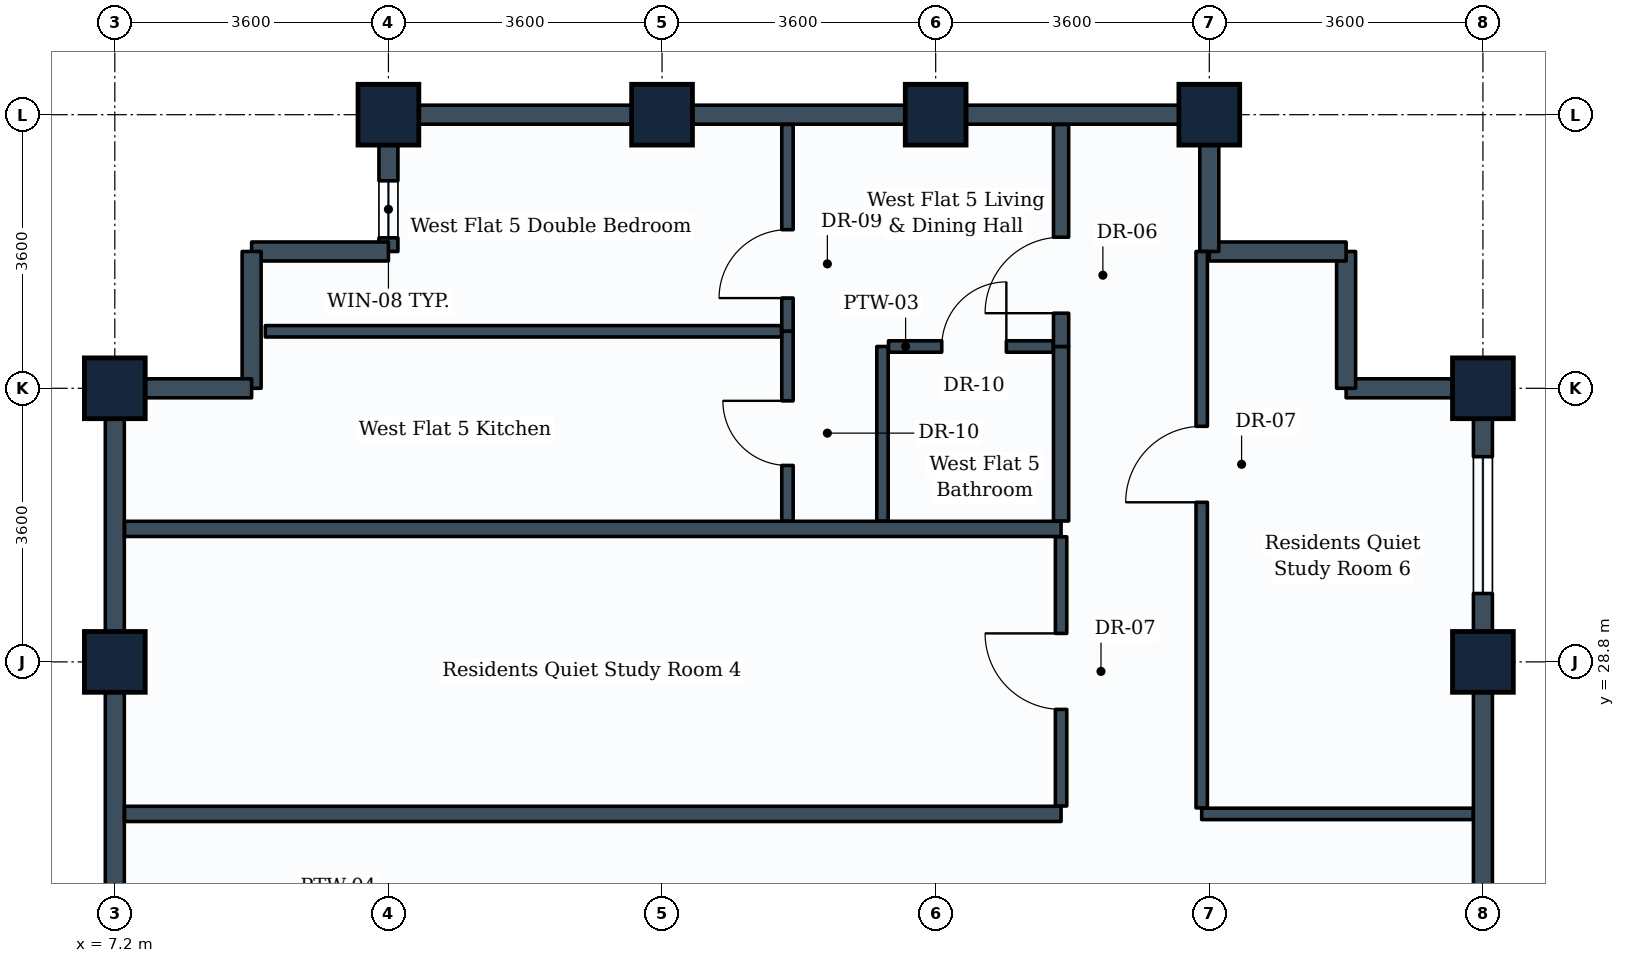
"""IFC4 building model, lengths in metres.
Left out: names, types, materials, properties, quantities, classifications, styles, units other than length and angle.
Written with IfcOpenShell. Run it as: python <this file> out.ifc"""

import sys

from ifc_helpers import new_model, si_unit, direction, frame, frame_2d, origin, origin_2d, place, context, subcontext, project, spatial, rectangle, extrude, element, fill, save


model = new_model("IFC4")
c1 = context("Model", 3, precision=1e-05, world=origin(), true_north=direction((0.0, 1.0)))
c2 = subcontext(c1, "Body", "Model", "MODEL_VIEW")
j1 = project(units=[si_unit("LENGTHUNIT", "METRE"), si_unit("PLANEANGLEUNIT", "RADIAN")], contexts=[c1])
p1 = place(None, origin())
s1 = spatial("IfcSite", under=j1, at=p1, CompositionType="ELEMENT")
p2 = place(p1, origin())
s2 = spatial("IfcBuilding", under=s1, at=p2, CompositionType="ELEMENT")
p3 = place(p2, frame((0.0, 0.0, 273.8)))
s3 = spatial("IfcBuildingStorey", under=s2, at=p3, CompositionType="ELEMENT", Elevation=273.8)
for number, where, z_axis, x_axis in (
    (1, (7.2, 28.8, 0.0), (0.0, 0.0, 1.0), (0.0, 1.0, 0.0)),
    (2, (7.2, 32.4, 0.0), (0.0, 0.0, 1.0), (0.0, 1.0, 0.0)),
    (3, (10.8, 36.0, 0.0), (0.0, 0.0, 1.0), (1.0, 0.0, 0.0)),
    (4, (14.4, 36.0, 0.0), (0.0, 0.0, 1.0), (1.0, 0.0, 0.0)),
    (5, (18.0, 36.0, 0.0), (0.0, 0.0, 1.0), (1.0, 0.0, 0.0)),
    (6, (21.6, 36.0, 0.0), (0.0, 0.0, 1.0), (1.0, 0.0, 0.0)),
    (7, (25.2, 28.8, 0.0), (0.0, 0.0, 1.0), (0.0, 1.0, 0.0)),
    (8, (25.2, 32.4, 0.0), (0.0, 0.0, 1.0), (0.0, 1.0, 0.0)),
):
    element("IfcColumn", number, at=place(p3, frame(where, z_axis=z_axis, x_axis=x_axis)), inside=s3, PredefinedType="COLUMN", context=c2, shape_type="SweptSolid", body=[
        extrude(rectangle(XDim=0.8, YDim=0.8, at=origin_2d()), origin(), (0.0, 0.0, 1.0), 3.6),
    ])
p4 = place(p3, frame((25.2, 28.8, 0.0), z_axis=(0.0, 0.0, 1.0), x_axis=(0.0, -1.0, 0.0)))
e9 = element("IfcWall", 9, at=p4, inside=s3, PredefinedType="STANDARD", context=c2, shape_type="SweptSolid", body=[
    extrude(rectangle(XDim=3.6, YDim=0.25, at=frame_2d((1.8, 0.0))), origin(), (0.0, 0.0, 1.0), 2.83),
])
p5 = place(p3, frame((25.2, 32.4, 0.0), z_axis=(0.0, 0.0, 1.0), x_axis=(0.0, -1.0, 0.0)))
e10 = element("IfcWall", 10, at=p5, inside=s3, PredefinedType="STANDARD", context=c2, shape_type="SweptSolid", body=[
    extrude(rectangle(XDim=3.6, YDim=0.25, at=frame_2d((1.8, 0.0))), origin(), (0.0, 0.0, 1.0), 2.83),
])
p6 = place(p5, frame((0.9, 0.0, 0.85)))
e11 = element("IfcOpeningElement", 11, at=p6, cuts=e10, PredefinedType="OPENING", context=c2, shape_type="SweptSolid", body=[
    extrude(rectangle(XDim=1.8, YDim=1.35, at=frame_2d((0.9, 0.675))), frame((0.0, 0.135, 0.0), z_axis=(0.0, -1.0, 0.0), x_axis=(1.0, 0.0, 0.0)), (0.0, 0.0, 1.0), 0.27),
])
p7 = place(p3, frame((23.4, 32.4, 0.0), z_axis=(0.0, 0.0, 1.0), x_axis=(1.0, 0.0, 0.0)))
e12 = element("IfcWall", 12, at=p7, inside=s3, PredefinedType="STANDARD", context=c2, shape_type="SweptSolid", body=[
    extrude(rectangle(XDim=1.8, YDim=0.25, at=frame_2d((0.9, 0.0))), origin(), (0.0, 0.0, 1.0), 2.83),
])
p8 = place(p3, frame((23.4, 32.4, 0.0), z_axis=(0.0, 0.0, 1.0), x_axis=(0.0, 1.0, 0.0)))
e13 = element("IfcWall", 13, at=p8, inside=s3, PredefinedType="STANDARD", context=c2, shape_type="SweptSolid", body=[
    extrude(rectangle(XDim=1.8, YDim=0.25, at=frame_2d((0.9, 0.0))), origin(), (0.0, 0.0, 1.0), 3.335),
])
p9 = place(p3, frame((21.6, 34.2, 0.0), z_axis=(0.0, 0.0, 1.0), x_axis=(1.0, 0.0, 0.0)))
e14 = element("IfcWall", 14, at=p9, inside=s3, PredefinedType="STANDARD", context=c2, shape_type="SweptSolid", body=[
    extrude(rectangle(XDim=1.8, YDim=0.25, at=frame_2d((0.9, 0.0))), origin(), (0.0, 0.0, 1.0), 3.335),
])
p10 = place(p3, frame((21.6, 34.2, 0.0), z_axis=(0.0, 0.0, 1.0), x_axis=(0.0, 1.0, 0.0)))
e15 = element("IfcWall", 15, at=p10, inside=s3, PredefinedType="STANDARD", context=c2, shape_type="SweptSolid", body=[
    extrude(rectangle(XDim=1.8, YDim=0.25, at=frame_2d((0.9, 0.0))), origin(), (0.0, 0.0, 1.0), 2.83),
])
for number, where, z_axis, x_axis in (
    (16, (18.0, 36.0, 0.0), (0.0, 0.0, 1.0), (1.0, 0.0, 0.0)),
    (17, (14.4, 36.0, 0.0), (0.0, 0.0, 1.0), (1.0, 0.0, 0.0)),
):
    element("IfcWall", number, at=place(p3, frame(where, z_axis=z_axis, x_axis=x_axis)), inside=s3, PredefinedType="STANDARD", context=c2, shape_type="SweptSolid", body=[
        extrude(rectangle(XDim=3.6, YDim=0.25, at=frame_2d((1.8, 0.0))), origin(), (0.0, 0.0, 1.0), 2.83),
    ])
p11 = place(p3, frame((10.8, 36.0, 0.0), z_axis=(0.0, 0.0, 1.0), x_axis=(1.0, 0.0, 0.0)))
e18 = element("IfcWall", 18, at=p11, inside=s3, PredefinedType="STANDARD", context=c2, shape_type="SweptSolid", body=[
    extrude(rectangle(XDim=3.6, YDim=0.25, at=frame_2d((1.8, 0.0))), origin(), (0.0, 0.0, 1.0), 2.83),
])
p12 = place(p3, frame((10.8, 34.2, 0.0), z_axis=(0.0, 0.0, 1.0), x_axis=(0.0, 1.0, 0.0)))
e19 = element("IfcWall", 19, at=p12, inside=s3, PredefinedType="STANDARD", context=c2, shape_type="SweptSolid", body=[
    extrude(rectangle(XDim=1.8, YDim=0.25, at=frame_2d((0.9, 0.0))), origin(), (0.0, 0.0, 1.0), 2.83),
])
p13 = place(p12, frame((0.18, 0.0, 0.85)))
e20 = element("IfcOpeningElement", 20, at=p13, cuts=e19, PredefinedType="OPENING", context=c2, shape_type="SweptSolid", body=[
    extrude(rectangle(XDim=0.75, YDim=1.05, at=frame_2d((0.375, 0.525))), frame((0.0, 0.135, 0.0), z_axis=(0.0, -1.0, 0.0), x_axis=(1.0, 0.0, 0.0)), (0.0, 0.0, 1.0), 0.27),
])
for number, where, z_axis, x_axis in (
    (21, (9.0, 34.2, 0.0), (0.0, 0.0, 1.0), (1.0, 0.0, 0.0)),
    (22, (9.0, 32.4, 0.0), (0.0, 0.0, 1.0), (0.0, 1.0, 0.0)),
):
    element("IfcWall", number, at=place(p3, frame(where, z_axis=z_axis, x_axis=x_axis)), inside=s3, PredefinedType="STANDARD", context=c2, shape_type="SweptSolid", body=[
        extrude(rectangle(XDim=1.8, YDim=0.25, at=frame_2d((0.9, 0.0))), origin(), (0.0, 0.0, 1.0), 3.335),
    ])
p14 = place(p3, frame((7.2, 32.4, 0.0), z_axis=(0.0, 0.0, 1.0), x_axis=(1.0, 0.0, 0.0)))
e23 = element("IfcWall", 23, at=p14, inside=s3, PredefinedType="STANDARD", context=c2, shape_type="SweptSolid", body=[
    extrude(rectangle(XDim=1.8, YDim=0.25, at=frame_2d((0.9, 0.0))), origin(), (0.0, 0.0, 1.0), 2.83),
])
p15 = place(p3, frame((7.2, 28.8, 0.0), z_axis=(0.0, 0.0, 1.0), x_axis=(0.0, 1.0, 0.0)))
e24 = element("IfcWall", 24, at=p15, inside=s3, PredefinedType="STANDARD", context=c2, shape_type="SweptSolid", body=[
    extrude(rectangle(XDim=3.6, YDim=0.25, at=frame_2d((1.8, 0.0))), origin(), (0.0, 0.0, 1.0), 2.83),
])
p16 = place(p3, frame((7.2, 25.2, 0.0), z_axis=(0.0, 0.0, 1.0), x_axis=(0.0, 1.0, 0.0)))
e25 = element("IfcWall", 25, at=p16, inside=s3, PredefinedType="STANDARD", context=c2, shape_type="SweptSolid", body=[
    extrude(rectangle(XDim=3.6, YDim=0.25, at=frame_2d((1.8, 0.0))), origin(), (0.0, 0.0, 1.0), 2.83),
])
for number, where, z_axis, x_axis in (
    (26, (7.329, 26.8, 0.0), (0.0, 0.0, 1.0), (1.0, 0.0, 0.0)),
    (27, (7.329, 30.55, 0.0), (0.0, 0.0, 1.0), (1.0, 0.0, 0.0)),
):
    element("IfcWall", number, at=place(p3, frame(where, z_axis=z_axis, x_axis=x_axis)), inside=s3, PredefinedType="PARTITIONING", context=c2, shape_type="SweptSolid", body=[
        extrude(rectangle(XDim=12.321, YDim=0.2, at=frame_2d((6.16, 0.0))), origin(), (0.0, 0.0, 1.0), 2.83),
    ])
p17 = place(p3, frame((19.65, 26.904, 0.0), z_axis=(0.0, 0.0, 1.0), x_axis=(0.0, 1.0, 0.0)))
e28 = element("IfcWall", 28, at=p17, inside=s3, PredefinedType="PARTITIONING", context=c2, shape_type="SweptSolid", body=[
    extrude(rectangle(XDim=3.542, YDim=0.15, at=frame_2d((1.771, 0.0))), origin(), (0.0, 0.0, 1.0), 3.03),
])
p18 = place(p17, frame((1.271, 0.0, 0.0)))
e29 = element("IfcOpeningElement", 29, at=p18, cuts=e28, PredefinedType="OPENING", context=c2, shape_type="SweptSolid", body=[
    extrude(rectangle(XDim=1.0, YDim=2.1, at=frame_2d((0.5, 1.05))), frame((0.0, 0.085, 0.0), z_axis=(0.0, -1.0, 0.0), x_axis=(1.0, 0.0, 0.0)), (0.0, 0.0, 1.0), 0.17),
])
p19 = place(p3, frame((19.65, 30.654, 0.0), z_axis=(0.0, 0.0, 1.0), x_axis=(0.0, 1.0, 0.0)))
e30 = element("IfcWall", 30, at=p19, inside=s3, PredefinedType="PARTITIONING", context=c2, shape_type="SweptSolid", body=[
    extrude(rectangle(XDim=2.296, YDim=0.2, at=frame_2d((1.148, 0.0))), origin(), (0.0, 0.0, 1.0), 3.335),
])
p20 = place(p3, frame((17.3, 30.654, 0.0), z_axis=(0.0, 0.0, 1.0), x_axis=(0.0, 1.0, 0.0)))
e31 = element("IfcWall", 31, at=p20, inside=s3, PredefinedType="PARTITIONING", context=c2, shape_type="SweptSolid", body=[
    extrude(rectangle(XDim=2.296, YDim=0.15, at=frame_2d((1.148, 0.0))), origin(), (0.0, 0.0, 1.0), 3.335),
])
p21 = place(p3, frame((17.379, 32.95, 0.0), z_axis=(0.0, 0.0, 1.0), x_axis=(1.0, 0.0, 0.0)))
e32 = element("IfcWall", 32, at=p21, inside=s3, PredefinedType="PARTITIONING", context=c2, shape_type="SweptSolid", body=[
    extrude(rectangle(XDim=2.167, YDim=0.15, at=frame_2d((1.083, 0.0))), origin(), (0.0, 0.0, 1.0), 3.03),
])
p22 = place(p21, frame((0.701, 0.0, 0.0)))
e33 = element("IfcOpeningElement", 33, at=p22, cuts=e32, PredefinedType="OPENING", context=c2, shape_type="SweptSolid", body=[
    extrude(rectangle(XDim=0.85, YDim=2.1, at=frame_2d((0.425, 1.05))), frame((0.0, 0.085, 0.0), z_axis=(0.0, -1.0, 0.0), x_axis=(1.0, 0.0, 0.0)), (0.0, 0.0, 1.0), 0.17),
])
p23 = place(p3, frame((19.65, 32.95, 0.0), z_axis=(0.0, 0.0, 1.0), x_axis=(0.0, 1.0, 0.0)))
e34 = element("IfcWall", 34, at=p23, inside=s3, PredefinedType="PARTITIONING", context=c2, shape_type="SweptSolid", body=[
    extrude(rectangle(XDim=2.921, YDim=0.2, at=frame_2d((1.46, 0.0))), origin(), (0.0, 0.0, 1.0), 2.83),
])
p24 = place(p23, frame((0.438, 0.0, 0.0)))
e35 = element("IfcOpeningElement", 35, at=p24, cuts=e34, PredefinedType="OPENING", context=c2, shape_type="SweptSolid", body=[
    extrude(rectangle(XDim=1.0, YDim=2.1, at=frame_2d((0.5, 1.05))), frame((0.0, 0.11, 0.0), z_axis=(0.0, -1.0, 0.0), x_axis=(1.0, 0.0, 0.0)), (0.0, 0.0, 1.0), 0.22),
])
p25 = place(p3, frame((16.05, 33.15, 0.0), z_axis=(0.0, 0.0, 1.0), x_axis=(0.0, 1.0, 0.0)))
e36 = element("IfcWall", 36, at=p25, inside=s3, PredefinedType="PARTITIONING", context=c2, shape_type="SweptSolid", body=[
    extrude(rectangle(XDim=2.721, YDim=0.15, at=frame_2d((1.361, 0.0))), origin(), (0.0, 0.0, 1.0), 2.83),
])
p26 = place(p25, frame((0.437, 0.0, 0.0)))
e37 = element("IfcOpeningElement", 37, at=p26, cuts=e36, PredefinedType="OPENING", context=c2, shape_type="SweptSolid", body=[
    extrude(rectangle(XDim=0.9, YDim=2.1, at=frame_2d((0.45, 1.05))), frame((0.0, 0.085, 0.0), z_axis=(0.0, -1.0, 0.0), x_axis=(1.0, 0.0, 0.0)), (0.0, 0.0, 1.0), 0.17),
])
p27 = place(p3, frame((16.05, 30.654, 0.0), z_axis=(0.0, 0.0, 1.0), x_axis=(0.0, 1.0, 0.0)))
e38 = element("IfcWall", 38, at=p27, inside=s3, PredefinedType="PARTITIONING", context=c2, shape_type="SweptSolid", body=[
    extrude(rectangle(XDim=2.496, YDim=0.15, at=frame_2d((1.248, 0.0))), origin(), (0.0, 0.0, 1.0), 3.335),
])
p28 = place(p27, frame((0.731, 0.0, 0.0)))
e39 = element("IfcOpeningElement", 39, at=p28, cuts=e38, PredefinedType="OPENING", context=c2, shape_type="SweptSolid", body=[
    extrude(rectangle(XDim=0.85, YDim=2.1, at=frame_2d((0.425, 1.05))), frame((0.0, 0.085, 0.0), z_axis=(0.0, -1.0, 0.0), x_axis=(1.0, 0.0, 0.0)), (0.0, 0.0, 1.0), 0.17),
])
p29 = place(p3, frame((9.18, 33.15, 0.0), z_axis=(0.0, 0.0, 1.0), x_axis=(1.0, 0.0, 0.0)))
e40 = element("IfcWall", 40, at=p29, inside=s3, PredefinedType="PARTITIONING", context=c2, shape_type="SweptSolid", body=[
    extrude(rectangle(XDim=6.791, YDim=0.15, at=frame_2d((3.396, 0.0))), origin(), (0.0, 0.0, 1.0), 3.335),
])
p30 = place(p3, frame((21.5, 26.8, 0.0), z_axis=(0.0, 0.0, 1.0), x_axis=(1.0, 0.0, 0.0)))
e41 = element("IfcWall", 41, at=p30, inside=s3, PredefinedType="PARTITIONING", context=c2, shape_type="SweptSolid", body=[
    extrude(rectangle(XDim=3.571, YDim=0.15, at=frame_2d((1.786, 0.0))), origin(), (0.0, 0.0, 1.0), 2.83),
])
p31 = place(p3, frame((21.5, 26.879, 0.0), z_axis=(0.0, 0.0, 1.0), x_axis=(0.0, 1.0, 0.0)))
e42 = element("IfcWall", 42, at=p31, inside=s3, PredefinedType="PARTITIONING", context=c2, shape_type="SweptSolid", body=[
    extrude(rectangle(XDim=7.321, YDim=0.15, at=frame_2d((3.661, 0.0))), origin(), (0.0, 0.0, 1.0), 3.03),
])
p32 = place(p31, frame((4.021, 0.0, 0.0)))
e43 = element("IfcOpeningElement", 43, at=p32, cuts=e42, PredefinedType="OPENING", context=c2, shape_type="SweptSolid", body=[
    extrude(rectangle(XDim=1.0, YDim=2.1, at=frame_2d((0.5, 1.05))), frame((0.0, 0.085, 0.0), z_axis=(0.0, -1.0, 0.0), x_axis=(1.0, 0.0, 0.0)), (0.0, 0.0, 1.0), 0.17),
])
p33 = place(p6, origin())
e44 = element("IfcWindow", 44, at=p33, inside=s3, PartitioningType="SINGLE_PANEL", PredefinedType="WINDOW", context=c2, shape_type="SweptSolid", body=[
    extrude(rectangle(XDim=1.8, YDim=1.35, at=frame_2d((0.9, 0.675))), frame((0.0, 0.03, 0.0), z_axis=(0.0, -1.0, 0.0), x_axis=(1.0, 0.0, 0.0)), (0.0, 0.0, 1.0), 0.06),
])
fill(e11, e44)
p34 = place(p18, origin())
e45 = element("IfcDoor", 45, at=p34, inside=s3, OperationType="SINGLE_SWING_RIGHT", PredefinedType="DOOR", context=c2, shape_type="SweptSolid", body=[
    extrude(rectangle(XDim=1.0, YDim=2.1, at=frame_2d((0.5, 1.05))), frame((0.0, 0.025, 0.0), z_axis=(0.0, -1.0, 0.0), x_axis=(1.0, 0.0, 0.0)), (0.0, 0.0, 1.0), 0.05),
])
fill(e29, e45)
p35 = place(p22, origin())
e46 = element("IfcDoor", 46, at=p35, inside=s3, OperationType="SINGLE_SWING_RIGHT", PredefinedType="DOOR", context=c2, shape_type="SweptSolid", body=[
    extrude(rectangle(XDim=0.85, YDim=2.1, at=frame_2d((0.425, 1.05))), frame((0.0, 0.025, 0.0), z_axis=(0.0, -1.0, 0.0), x_axis=(1.0, 0.0, 0.0)), (0.0, 0.0, 1.0), 0.05),
])
fill(e33, e46)
p36 = place(p24, origin())
e47 = element("IfcDoor", 47, at=p36, inside=s3, OperationType="SINGLE_SWING_LEFT", PredefinedType="DOOR", context=c2, shape_type="SweptSolid", body=[
    extrude(rectangle(XDim=1.0, YDim=2.1, at=frame_2d((0.5, 1.05))), frame((0.0, 0.025, 0.0), z_axis=(0.0, -1.0, 0.0), x_axis=(1.0, 0.0, 0.0)), (0.0, 0.0, 1.0), 0.05),
])
fill(e35, e47)
p37 = place(p26, origin())
e48 = element("IfcDoor", 48, at=p37, inside=s3, OperationType="SINGLE_SWING_LEFT", PredefinedType="DOOR", context=c2, shape_type="SweptSolid", body=[
    extrude(rectangle(XDim=0.9, YDim=2.1, at=frame_2d((0.45, 1.05))), frame((0.0, 0.025, 0.0), z_axis=(0.0, -1.0, 0.0), x_axis=(1.0, 0.0, 0.0)), (0.0, 0.0, 1.0), 0.05),
])
fill(e37, e48)
p38 = place(p28, origin())
e49 = element("IfcDoor", 49, at=p38, inside=s3, OperationType="SINGLE_SWING_RIGHT", PredefinedType="DOOR", context=c2, shape_type="SweptSolid", body=[
    extrude(rectangle(XDim=0.85, YDim=2.1, at=frame_2d((0.425, 1.05))), frame((0.0, 0.025, 0.0), z_axis=(0.0, -1.0, 0.0), x_axis=(1.0, 0.0, 0.0)), (0.0, 0.0, 1.0), 0.05),
])
fill(e39, e49)
p39 = place(p32, origin())
e50 = element("IfcDoor", 50, at=p39, inside=s3, OperationType="SINGLE_SWING_LEFT", PredefinedType="DOOR", context=c2, shape_type="SweptSolid", body=[
    extrude(rectangle(XDim=1.0, YDim=2.1, at=frame_2d((0.5, 1.05))), frame((0.0, 0.025, 0.0), z_axis=(0.0, -1.0, 0.0), x_axis=(1.0, 0.0, 0.0)), (0.0, 0.0, 1.0), 0.05),
])
fill(e43, e50)
p40 = place(p13, origin())
e51 = element("IfcWindow", 51, at=p40, inside=s3, PartitioningType="SINGLE_PANEL", PredefinedType="WINDOW", context=c2, shape_type="SweptSolid", body=[
    extrude(rectangle(XDim=0.75, YDim=1.05, at=frame_2d((0.375, 0.525))), frame((0.0, 0.03, 0.0), z_axis=(0.0, -1.0, 0.0), x_axis=(1.0, 0.0, 0.0)), (0.0, 0.0, 1.0), 0.06),
])
fill(e20, e51)
save(model, sys.argv[1])
